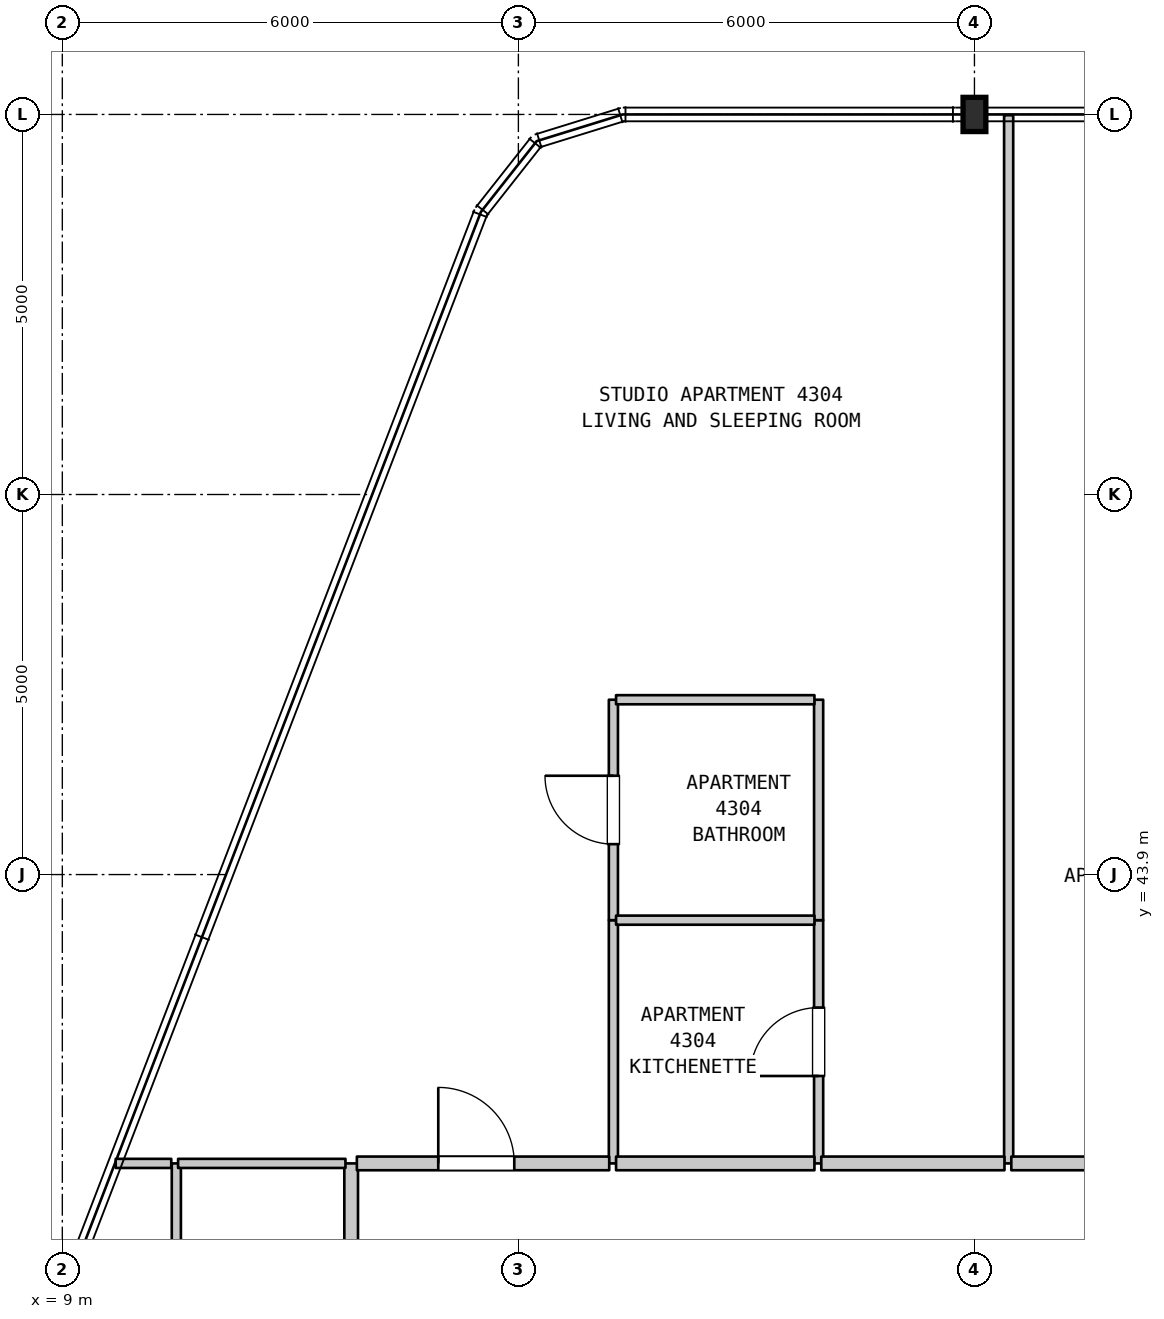
"""IFC4 building model, lengths in metres.
Left out: names, types, materials, properties, quantities, classifications, styles, units other than length and angle.
Written with IfcOpenShell. Run it as: python <this file> out.ifc"""

import sys

from ifc_helpers import new_model, si_unit, direction, frame, frame_2d, origin, origin_2d, place, context, subcontext, project, spatial, rectangle, i_section, extrude, element, fill, save


model = new_model("IFC4")
c1 = context("Model", 3, precision=1e-05, world=origin(), true_north=direction((0.0, 1.0)))
c2 = subcontext(c1, "Body", "Model", "MODEL_VIEW")
j1 = project(units=[si_unit("LENGTHUNIT", "METRE"), si_unit("PLANEANGLEUNIT", "RADIAN")], contexts=[c1])
p1 = place(None, origin())
s1 = spatial("IfcSite", under=j1, at=p1, CompositionType="ELEMENT")
p2 = place(p1, origin())
s2 = spatial("IfcBuilding", under=s1, at=p2, CompositionType="ELEMENT")
p3 = place(p2, frame((0.0, 0.0, 176.5)))
s3 = spatial("IfcBuildingStorey", under=s2, at=p3, CompositionType="ELEMENT", Elevation=176.5)
p4 = place(p3, frame((21.0, 53.9, 0.0), z_axis=(0.0, 0.0, 1.0), x_axis=(1.0, 0.0, 0.0)))
e1 = element("IfcColumn", 1, at=p4, inside=s3, PredefinedType="COLUMN", context=c2, shape_type="SweptSolid", body=[
    extrude(i_section(OverallWidth=0.3, OverallDepth=0.45, WebThickness=0.014, FlangeThickness=0.026, FilletRadius=0.027, at=origin_2d()), origin(), (0.0, 0.0, 1.0), 3.7),
])
p5 = place(p3, frame((10.5, 31.45, 0.0), z_axis=(0.0, 0.0, 1.0), x_axis=(0.0, 1.0, 0.0)))
e2 = element("IfcWall", 2, at=p5, inside=s3, PredefinedType="PARTITIONING", context=c2, shape_type="SweptSolid", body=[
    extrude(rectangle(XDim=8.65, YDim=0.12, at=frame_2d((4.325, 0.0))), origin(), (0.0, 0.0, 1.0), 3.39),
])
p6 = place(p3, frame((12.8, 31.45, 0.0), z_axis=(0.0, 0.0, 1.0), x_axis=(0.0, 1.0, 0.0)))
e3 = element("IfcWall", 3, at=p6, inside=s3, PredefinedType="STANDARD", context=c2, shape_type="SweptSolid", body=[
    extrude(rectangle(XDim=8.65, YDim=0.18, at=frame_2d((4.325, 0.0))), origin(), (0.0, 0.0, 1.0), 3.39),
])
p7 = place(p3, frame((16.25, 40.1, 0.0), z_axis=(0.0, 0.0, 1.0), x_axis=(0.0, 1.0, 0.0)))
e4 = element("IfcWall", 4, at=p7, inside=s3, PredefinedType="PARTITIONING", context=c2, shape_type="SweptSolid", body=[
    extrude(rectangle(XDim=3.2, YDim=0.12, at=frame_2d((1.6, 0.0))), origin(), (0.0, 0.0, 1.0), 3.39),
])
p8 = place(p3, frame((16.25, 43.3, 0.0), z_axis=(0.0, 0.0, 1.0), x_axis=(0.0, 1.0, 0.0)))
e5 = element("IfcWall", 5, at=p8, inside=s3, PredefinedType="PARTITIONING", context=c2, shape_type="SweptSolid", body=[
    extrude(rectangle(XDim=2.9, YDim=0.12, at=frame_2d((1.45, 0.0))), origin(), (0.0, 0.0, 1.0), 3.39),
])
p9 = place(p8, frame((1.0, 0.0, 0.0)))
e6 = element("IfcOpeningElement", 6, at=p9, cuts=e5, PredefinedType="OPENING", context=c2, shape_type="SweptSolid", body=[
    extrude(rectangle(XDim=0.9, YDim=2.1, at=frame_2d((0.45, 1.05))), frame((0.0, 0.07, 0.0), z_axis=(0.0, -1.0, 0.0), x_axis=(1.0, 0.0, 0.0)), (0.0, 0.0, 1.0), 0.14),
])
p10 = place(p3, frame((18.95, 40.1, 0.0), z_axis=(0.0, 0.0, 1.0), x_axis=(0.0, 1.0, 0.0)))
e7 = element("IfcWall", 7, at=p10, inside=s3, PredefinedType="PARTITIONING", context=c2, shape_type="SweptSolid", body=[
    extrude(rectangle(XDim=3.2, YDim=0.12, at=frame_2d((1.6, 0.0))), origin(), (0.0, 0.0, 1.0), 3.39),
])
p11 = place(p10, frame((1.15, 0.0, 0.0)))
e8 = element("IfcOpeningElement", 8, at=p11, cuts=e7, PredefinedType="OPENING", context=c2, shape_type="SweptSolid", body=[
    extrude(rectangle(XDim=0.9, YDim=2.15, at=frame_2d((0.45, 1.075))), frame((0.0, 0.07, 0.0), z_axis=(0.0, -1.0, 0.0), x_axis=(1.0, 0.0, 0.0)), (0.0, 0.0, 1.0), 0.14),
])
p12 = place(p3, frame((18.95, 43.3, 0.0), z_axis=(0.0, 0.0, 1.0), x_axis=(0.0, 1.0, 0.0)))
e9 = element("IfcWall", 9, at=p12, inside=s3, PredefinedType="PARTITIONING", context=c2, shape_type="SweptSolid", body=[
    extrude(rectangle(XDim=2.9, YDim=0.12, at=frame_2d((1.45, 0.0))), origin(), (0.0, 0.0, 1.0), 3.39),
])
p13 = place(p3, frame((21.45, 40.1, 0.0), z_axis=(0.0, 0.0, 1.0), x_axis=(0.0, 1.0, 0.0)))
e10 = element("IfcWall", 10, at=p13, inside=s3, PredefinedType="PARTITIONING", context=c2, shape_type="SweptSolid", body=[
    extrude(rectangle(XDim=13.79, YDim=0.12, at=frame_2d((6.895, 0.0))), origin(), (0.0, 0.0, 1.0), 3.39),
])
p14 = place(p3, frame((9.702, 40.1, 0.0), z_axis=(0.0, 0.0, 1.0), x_axis=(1.0, 0.0, 0.0)))
e11 = element("IfcWall", 11, at=p14, inside=s3, PredefinedType="PARTITIONING", context=c2, shape_type="SweptSolid", body=[
    extrude(rectangle(XDim=0.731, YDim=0.12, at=frame_2d((0.366, 0.0))), origin(), (0.0, 0.0, 1.0), 3.39),
])
p15 = place(p3, frame((10.523, 40.1, 0.0), z_axis=(0.0, 0.0, 1.0), x_axis=(1.0, 0.0, 0.0)))
e12 = element("IfcWall", 12, at=p15, inside=s3, PredefinedType="PARTITIONING", context=c2, shape_type="SweptSolid", body=[
    extrude(rectangle(XDim=2.202, YDim=0.12, at=frame_2d((1.101, 0.0))), origin(), (0.0, 0.0, 1.0), 3.39),
])
p16 = place(p3, frame((12.875, 40.1, 0.0), z_axis=(0.0, 0.0, 1.0), x_axis=(1.0, 0.0, 0.0)))
e13 = element("IfcWall", 13, at=p16, inside=s3, PredefinedType="STANDARD", context=c2, shape_type="SweptSolid", body=[
    extrude(rectangle(XDim=3.32, YDim=0.18, at=frame_2d((1.66, 0.0))), origin(), (0.0, 0.0, 1.0), 3.39),
])
p17 = place(p16, frame((1.071, 0.0, 0.0)))
e14 = element("IfcOpeningElement", 14, at=p17, cuts=e13, PredefinedType="OPENING", context=c2, shape_type="SweptSolid", body=[
    extrude(rectangle(XDim=1.0, YDim=2.15, at=frame_2d((0.5, 1.075))), frame((0.0, 0.1, 0.0), z_axis=(0.0, -1.0, 0.0), x_axis=(1.0, 0.0, 0.0)), (0.0, 0.0, 1.0), 0.2),
])
p18 = place(p3, frame((16.285, 40.1, 0.0), z_axis=(0.0, 0.0, 1.0), x_axis=(1.0, 0.0, 0.0)))
e15 = element("IfcWall", 15, at=p18, inside=s3, PredefinedType="STANDARD", context=c2, shape_type="SweptSolid", body=[
    extrude(rectangle(XDim=2.61, YDim=0.18, at=frame_2d((1.305, 0.0))), origin(), (0.0, 0.0, 1.0), 3.39),
])
p19 = place(p3, frame((18.985, 40.1, 0.0), z_axis=(0.0, 0.0, 1.0), x_axis=(1.0, 0.0, 0.0)))
e16 = element("IfcWall", 16, at=p19, inside=s3, PredefinedType="STANDARD", context=c2, shape_type="SweptSolid", body=[
    extrude(rectangle(XDim=2.41, YDim=0.18, at=frame_2d((1.205, 0.0))), origin(), (0.0, 0.0, 1.0), 3.39),
])
p20 = place(p3, frame((21.485, 40.1, 0.0), z_axis=(0.0, 0.0, 1.0), x_axis=(1.0, 0.0, 0.0)))
e17 = element("IfcWall", 17, at=p20, inside=s3, PredefinedType="STANDARD", context=c2, shape_type="SweptSolid", body=[
    extrude(rectangle(XDim=4.19, YDim=0.18, at=frame_2d((2.095, 0.0))), origin(), (0.0, 0.0, 1.0), 3.39),
])
p21 = place(p20, frame((1.522, 0.0, 0.0)))
e18 = element("IfcOpeningElement", 18, at=p21, cuts=e17, PredefinedType="OPENING", context=c2, shape_type="SweptSolid", body=[
    extrude(rectangle(XDim=1.0, YDim=2.15, at=frame_2d((0.5, 1.075))), frame((0.0, 0.1, 0.0), z_axis=(0.0, -1.0, 0.0), x_axis=(1.0, 0.0, 0.0)), (0.0, 0.0, 1.0), 0.2),
])
for number, where, z_axis, x_axis in (
    (19, (16.285, 43.3, 0.0), (0.0, 0.0, 1.0), (1.0, 0.0, 0.0)),
    (20, (16.285, 46.2, 0.0), (0.0, 0.0, 1.0), (1.0, 0.0, 0.0)),
):
    element("IfcWall", number, at=place(p3, frame(where, z_axis=z_axis, x_axis=x_axis)), inside=s3, PredefinedType="PARTITIONING", context=c2, shape_type="SweptSolid", body=[
        extrude(rectangle(XDim=2.61, YDim=0.12, at=frame_2d((1.305, 0.0))), origin(), (0.0, 0.0, 1.0), 3.39),
    ])
p22 = place(p9, origin())
e21 = element("IfcDoor", 21, at=p22, inside=s3, OperationType="SINGLE_SWING_RIGHT", PredefinedType="DOOR", context=c2, shape_type="SweptSolid", body=[
    extrude(rectangle(XDim=0.9, YDim=2.1, at=frame_2d((0.45, 1.05))), frame((0.0, 0.025, 0.0), z_axis=(0.0, -1.0, 0.0), x_axis=(1.0, 0.0, 0.0)), (0.0, 0.0, 1.0), 0.05),
])
fill(e6, e21)
p23 = place(p11, origin())
e22 = element("IfcDoor", 22, at=p23, inside=s3, OperationType="SINGLE_SWING_LEFT", PredefinedType="DOOR", context=c2, shape_type="SweptSolid", body=[
    extrude(rectangle(XDim=0.9, YDim=2.15, at=frame_2d((0.45, 1.075))), frame((0.0, 0.025, 0.0), z_axis=(0.0, -1.0, 0.0), x_axis=(1.0, 0.0, 0.0)), (0.0, 0.0, 1.0), 0.05),
])
fill(e8, e22)
p24 = place(p17, origin())
e23 = element("IfcDoor", 23, at=p24, inside=s3, OperationType="SINGLE_SWING_LEFT", PredefinedType="DOOR", context=c2, shape_type="SweptSolid", body=[
    extrude(rectangle(XDim=1.0, YDim=2.15, at=frame_2d((0.5, 1.075))), frame((0.0, 0.025, 0.0), z_axis=(0.0, -1.0, 0.0), x_axis=(1.0, 0.0, 0.0)), (0.0, 0.0, 1.0), 0.05),
])
fill(e14, e23)
save(model, sys.argv[1])
